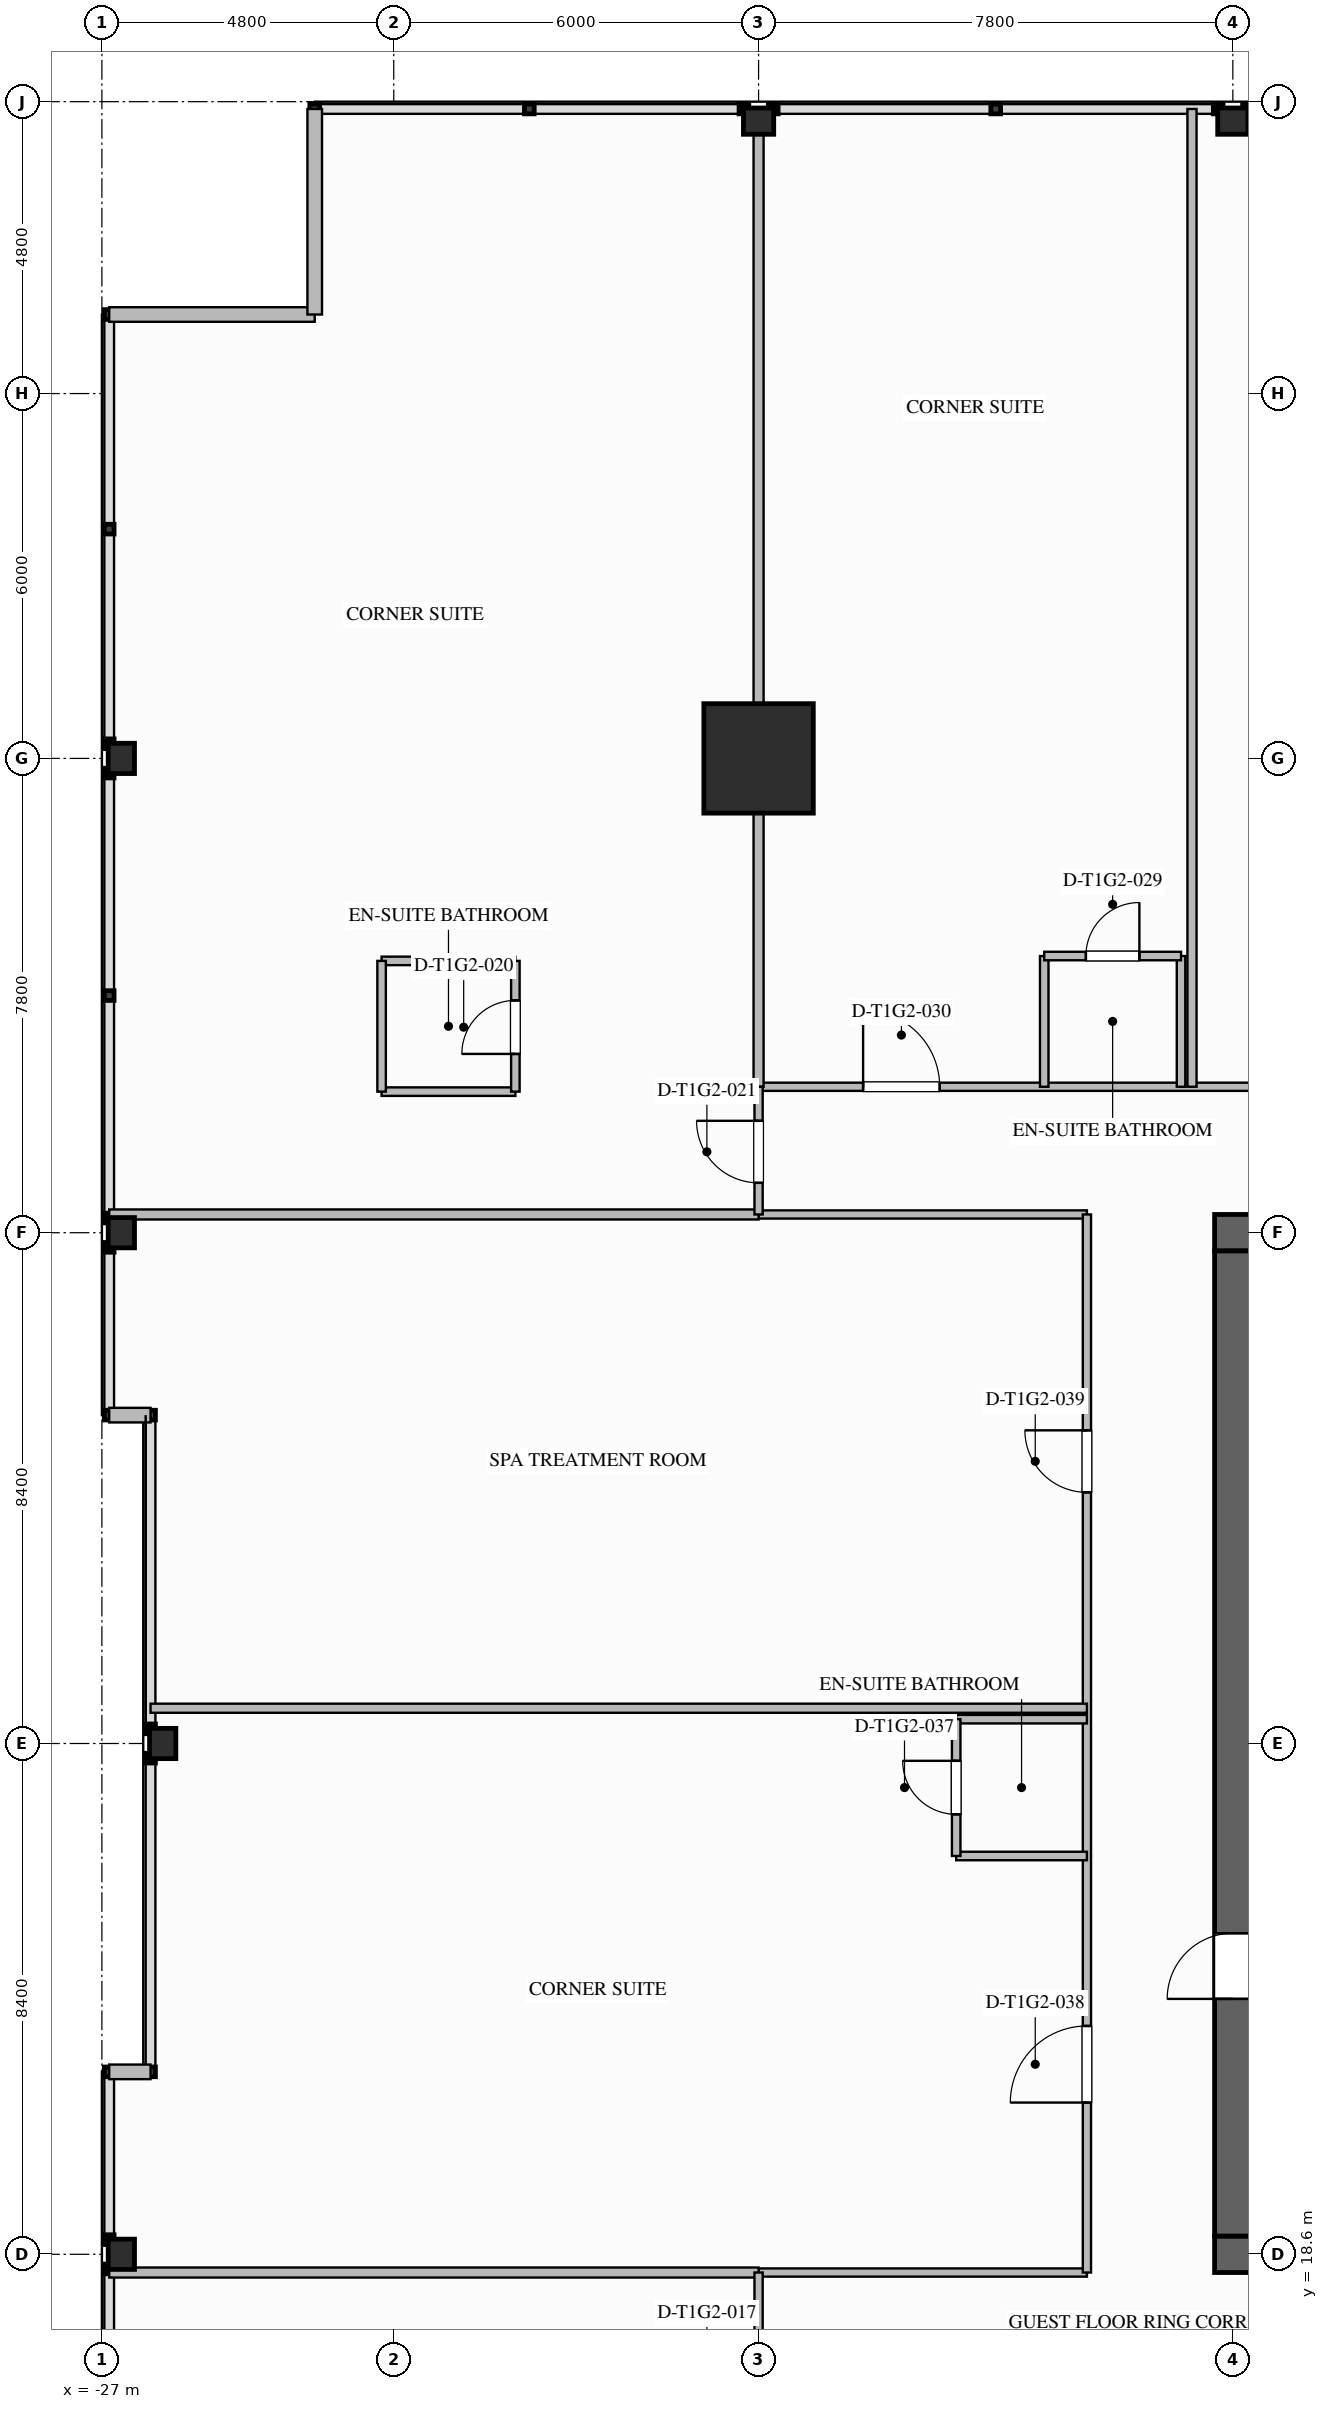
"""IFC4 building model, lengths in metres.
Left out: names, types, materials, properties, quantities, classifications, styles, units other than length and angle.
Written with IfcOpenShell. Run it as: python <this file> out.ifc"""

import sys

from ifc_helpers import new_model, si_unit, direction, frame, frame_2d, origin, origin_2d, place, context, subcontext, project, spatial, rectangle, i_section, extrude, element, fill, save


model = new_model("IFC4")
c1 = context("Model", 3, precision=1e-05, world=origin(), true_north=direction((0.0, 1.0)))
c2 = subcontext(c1, "Body", "Model", "MODEL_VIEW")
j1 = project(units=[si_unit("LENGTHUNIT", "METRE"), si_unit("PLANEANGLEUNIT", "RADIAN")], contexts=[c1])
p1 = place(None, origin())
s1 = spatial("IfcSite", under=j1, at=p1, CompositionType="ELEMENT")
p2 = place(p1, origin())
s2 = spatial("IfcBuilding", under=s1, at=p2, CompositionType="ELEMENT")
p3 = place(p2, frame((0.0, 0.0, 43.7)))
s3 = spatial("IfcBuildingStorey", under=s2, at=p3, CompositionType="ELEMENT", Elevation=43.7)
for number, where, z_axis, x_axis in (
    (1, (-8.7, 35.4, 0.0), (0.0, 0.0, 1.0), (1.0, 0.0, 0.0)),
    (2, (8.7, 18.6, 0.0), (0.0, 0.0, 1.0), (-1.0, 0.0, 0.0)),
):
    element("IfcWall", number, at=place(p3, frame(where, z_axis=z_axis, x_axis=x_axis)), inside=s3, PredefinedType="SHEAR", context=c2, shape_type="SweptSolid", body=[
        extrude(rectangle(XDim=17.4, YDim=0.6, at=frame_2d((8.7, 0.0))), origin(), (0.0, 0.0, 1.0), 3.5),
    ])
p4 = place(p3, frame((-8.4, 18.9, 0.0), z_axis=(0.0, 0.0, 1.0), x_axis=(0.0, 1.0, 0.0)))
e3 = element("IfcWall", 3, at=p4, inside=s3, PredefinedType="SHEAR", context=c2, shape_type="SweptSolid", body=[
    extrude(rectangle(XDim=16.2, YDim=0.6, at=frame_2d((8.1, 0.0))), origin(), (0.0, 0.0, 1.0), 3.5),
])
p5 = place(p4, frame((3.9, 0.0, 0.0)))
e4 = element("IfcOpeningElement", 4, at=p5, cuts=e3, PredefinedType="OPENING", context=c2, shape_type="SweptSolid", body=[
    extrude(rectangle(XDim=1.08, YDim=2.04, at=frame_2d((0.54, 1.02))), frame((0.0, 0.31, 0.0), z_axis=(0.0, -1.0, 0.0), x_axis=(1.0, 0.0, 0.0)), (0.0, 0.0, 1.0), 0.62),
])
p6 = place(p3, frame((-16.2, 43.2, 0.0), z_axis=(0.0, 0.0, 1.0), x_axis=(1.0, 0.0, 0.0)))
e5 = element("IfcColumn", 5, at=p6, inside=s3, PredefinedType="COLUMN", context=c2, shape_type="SweptSolid", body=[
    extrude(rectangle(XDim=1.8, YDim=1.8, at=origin_2d()), origin(), (0.0, 0.0, 1.0), 3.5),
])
for number, where, z_axis, x_axis in (
    (6, (-26.68, 18.6, 0.0), (0.0, 0.0, 1.0), (1.0, 0.0, 0.0)),
    (7, (-26.0, 27.0, 0.0), (0.0, 0.0, 1.0), (1.0, 0.0, 0.0)),
    (8, (-26.68, 35.4, 0.0), (0.0, 0.0, 1.0), (1.0, 0.0, 0.0)),
    (9, (-26.68, 43.2, 0.0), (0.0, 0.0, 1.0), (1.0, 0.0, 0.0)),
    (10, (-16.2, 53.68, 0.0), (0.0, 0.0, 1.0), (0.0, 1.0, 0.0)),
    (11, (-8.4, 53.68, 0.0), (0.0, 0.0, 1.0), (0.0, 1.0, 0.0)),
):
    element("IfcColumn", number, at=place(p3, frame(where, z_axis=z_axis, x_axis=x_axis)), inside=s3, PredefinedType="COLUMN", context=c2, shape_type="SweptSolid", body=[
        extrude(i_section(OverallWidth=0.432, OverallDepth=0.498, WebThickness=0.056, FlangeThickness=0.089, FilletRadius=0.03, at=origin_2d()), origin(), (0.0, 0.0, 1.0), 3.497),
    ])
for number, where, z_axis, x_axis in (
    (12, (-26.88, 50.5, 0.0), (0.0, 0.0, 1.0), (1.0, 0.0, 0.0)),
    (13, (-23.5, 50.5, 0.0), (0.0, 0.0, 1.0), (0.0, 1.0, 0.0)),
):
    element("IfcWall", number, at=place(p3, frame(where, z_axis=z_axis, x_axis=x_axis)), inside=s3, PredefinedType="STANDARD", context=c2, shape_type="SweptSolid", body=[
        extrude(rectangle(XDim=3.38, YDim=0.24, at=frame_2d((1.69, 0.0))), origin(), (0.0, 0.0, 1.0), 3.24),
    ])
for number, where, z_axis, x_axis in (
    (14, (-26.88, 21.6, 0.0), (0.0, 0.0, 1.0), (1.0, 0.0, 0.0)),
    (15, (-26.2, 32.4, 0.0), (0.0, 0.0, 1.0), (-1.0, 0.0, 0.0)),
):
    element("IfcWall", number, at=place(p3, frame(where, z_axis=z_axis, x_axis=x_axis)), inside=s3, PredefinedType="STANDARD", context=c2, shape_type="SweptSolid", body=[
        extrude(rectangle(XDim=0.68, YDim=0.24, at=frame_2d((0.34, 0.0))), origin(), (0.0, 0.0, 1.0), 3.24),
    ])
p7 = place(p3, frame((-16.2, 37.8, 0.0), z_axis=(0.0, 0.0, 1.0), x_axis=(1.0, 0.0, 0.0)))
e16 = element("IfcWall", 16, at=p7, inside=s3, PredefinedType="PARTITIONING", context=c2, shape_type="SweptSolid", body=[
    extrude(rectangle(XDim=32.4, YDim=0.135, at=frame_2d((16.2, 0.0))), origin(), (0.0, 0.0, 1.0), 3.24),
])
p8 = place(p7, frame((1.719, 0.0, 0.0)))
e17 = element("IfcOpeningElement", 17, at=p8, cuts=e16, PredefinedType="OPENING", context=c2, shape_type="SweptSolid", body=[
    extrude(rectangle(XDim=1.26, YDim=2.2, at=frame_2d((0.63, 1.1))), frame((0.0, 0.077, 0.0), z_axis=(0.0, -1.0, 0.0), x_axis=(1.0, 0.0, 0.0)), (0.0, 0.0, 1.0), 0.155),
])
p9 = place(p7, frame((10.143, 0.0, 0.0)))
e18 = element("IfcOpeningElement", 18, at=p9, cuts=e16, PredefinedType="OPENING", context=c2, shape_type="SweptSolid", body=[
    extrude(rectangle(XDim=1.26, YDim=2.2, at=frame_2d((0.63, 1.1))), frame((0.0, 0.077, 0.0), z_axis=(0.0, -1.0, 0.0), x_axis=(1.0, 0.0, 0.0)), (0.0, 0.0, 1.0), 0.155),
])
p10 = place(p7, frame((18.567, 0.0, 0.0)))
e19 = element("IfcOpeningElement", 19, at=p10, cuts=e16, PredefinedType="OPENING", context=c2, shape_type="SweptSolid", body=[
    extrude(rectangle(XDim=1.26, YDim=2.2, at=frame_2d((0.63, 1.1))), frame((0.0, 0.077, 0.0), z_axis=(0.0, -1.0, 0.0), x_axis=(1.0, 0.0, 0.0)), (0.0, 0.0, 1.0), 0.155),
])
p11 = place(p7, frame((26.343, 0.0, 0.0)))
e20 = element("IfcOpeningElement", 20, at=p11, cuts=e16, PredefinedType="OPENING", context=c2, shape_type="SweptSolid", body=[
    extrude(rectangle(XDim=1.26, YDim=2.2, at=frame_2d((0.63, 1.1))), frame((0.0, 0.077, 0.0), z_axis=(0.0, -1.0, 0.0), x_axis=(1.0, 0.0, 0.0)), (0.0, 0.0, 1.0), 0.155),
])
for number, where, z_axis, x_axis in (
    (21, (-16.2, 18.3, 0.0), (0.0, 0.0, 1.0), (1.0, 0.0, 0.0)),
    (22, (-16.2, 35.7, 0.0), (0.0, 0.0, 1.0), (1.0, 0.0, 0.0)),
):
    element("IfcWall", number, at=place(p3, frame(where, z_axis=z_axis, x_axis=x_axis)), inside=s3, PredefinedType="PARTITIONING", context=c2, shape_type="SweptSolid", body=[
        extrude(rectangle(XDim=5.4, YDim=0.135, at=frame_2d((2.7, 0.0))), origin(), (0.0, 0.0, 1.0), 3.24),
    ])
p12 = place(p3, frame((-10.8, 18.3, 0.0), z_axis=(0.0, 0.0, 1.0), x_axis=(0.0, 1.0, 0.0)))
e23 = element("IfcWall", 23, at=p12, inside=s3, PredefinedType="PARTITIONING", context=c2, shape_type="SweptSolid", body=[
    extrude(rectangle(XDim=17.4, YDim=0.135, at=frame_2d((8.7, 0.0))), origin(), (0.0, 0.0, 1.0), 3.24),
])
p13 = place(p12, frame((2.795, 0.0, 0.0)))
e24 = element("IfcOpeningElement", 24, at=p13, cuts=e23, PredefinedType="OPENING", context=c2, shape_type="SweptSolid", body=[
    extrude(rectangle(XDim=1.26, YDim=2.2, at=frame_2d((0.63, 1.1))), frame((0.0, 0.077, 0.0), z_axis=(0.0, -1.0, 0.0), x_axis=(1.0, 0.0, 0.0)), (0.0, 0.0, 1.0), 0.155),
])
p14 = place(p12, frame((12.83, 0.0, 0.0)))
e25 = element("IfcOpeningElement", 25, at=p14, cuts=e23, PredefinedType="OPENING", context=c2, shape_type="SweptSolid", body=[
    extrude(rectangle(XDim=1.02, YDim=2.15, at=frame_2d((0.51, 1.075))), frame((0.0, 0.077, 0.0), z_axis=(0.0, -1.0, 0.0), x_axis=(1.0, 0.0, 0.0)), (0.0, 0.0, 1.0), 0.155),
])
p15 = place(p3, frame((-16.2, 37.8, 0.0), z_axis=(0.0, 0.0, 1.0), x_axis=(0.0, 1.0, 0.0)))
e26 = element("IfcWall", 26, at=p15, inside=s3, PredefinedType="PARTITIONING", context=c2, shape_type="SweptSolid", body=[
    extrude(rectangle(XDim=16.08, YDim=0.165, at=frame_2d((8.04, 0.0))), origin(), (0.0, 0.0, 1.0), 2.298),
])
for number, where, z_axis, x_axis in (
    (27, (-26.88, 18.3, 0.0), (0.0, 0.0, 1.0), (1.0, 0.0, 0.0)),
    (28, (-26.88, 35.7, 0.0), (0.0, 0.0, 1.0), (1.0, 0.0, 0.0)),
):
    element("IfcWall", number, at=place(p3, frame(where, z_axis=z_axis, x_axis=x_axis)), inside=s3, PredefinedType="PARTITIONING", context=c2, shape_type="SweptSolid", body=[
        extrude(rectangle(XDim=10.68, YDim=0.165, at=frame_2d((5.34, 0.0))), origin(), (0.0, 0.0, 1.0), 2.298),
    ])
p16 = place(p3, frame((-16.2, 15.6, 0.0), z_axis=(0.0, 0.0, 1.0), x_axis=(0.0, 1.0, 0.0)))
e29 = element("IfcWall", 29, at=p16, inside=s3, PredefinedType="PARTITIONING", context=c2, shape_type="SweptSolid", body=[
    extrude(rectangle(XDim=2.7, YDim=0.135, at=frame_2d((1.35, 0.0))), origin(), (0.0, 0.0, 1.0), 2.298),
])
p17 = place(p16, frame((0.52, 0.0, 0.0)))
e30 = element("IfcOpeningElement", 30, at=p17, cuts=e29, PredefinedType="OPENING", context=c2, shape_type="SweptSolid", body=[
    extrude(rectangle(XDim=1.02, YDim=2.15, at=frame_2d((0.51, 1.075))), frame((0.0, 0.077, 0.0), z_axis=(0.0, -1.0, 0.0), x_axis=(1.0, 0.0, 0.0)), (0.0, 0.0, 1.0), 0.155),
])
p18 = place(p3, frame((-16.2, 35.7, 0.0), z_axis=(0.0, 0.0, 1.0), x_axis=(0.0, 1.0, 0.0)))
e31 = element("IfcWall", 31, at=p18, inside=s3, PredefinedType="PARTITIONING", context=c2, shape_type="SweptSolid", body=[
    extrude(rectangle(XDim=2.1, YDim=0.135, at=frame_2d((1.05, 0.0))), origin(), (0.0, 0.0, 1.0), 2.298),
])
p19 = place(p18, frame((0.52, 0.0, 0.0)))
e32 = element("IfcOpeningElement", 32, at=p19, cuts=e31, PredefinedType="OPENING", context=c2, shape_type="SweptSolid", body=[
    extrude(rectangle(XDim=1.02, YDim=2.15, at=frame_2d((0.51, 1.075))), frame((0.0, 0.077, 0.0), z_axis=(0.0, -1.0, 0.0), x_axis=(1.0, 0.0, 0.0)), (0.0, 0.0, 1.0), 0.155),
])
for number, where, z_axis, x_axis in (
    (33, (-22.4, 37.72, 0.0), (0.0, 0.0, 1.0), (1.0, 0.0, 0.0)),
    (34, (-22.4, 39.87, 0.0), (0.0, 0.0, 1.0), (1.0, 0.0, 0.0)),
):
    element("IfcWall", number, at=place(p3, frame(where, z_axis=z_axis, x_axis=x_axis)), inside=s3, PredefinedType="PLUMBINGWALL", context=c2, shape_type="SweptSolid", body=[
        extrude(rectangle(XDim=2.2, YDim=0.14, at=frame_2d((1.1, 0.0))), origin(), (0.0, 0.0, 1.0), 3.24),
    ])
p20 = place(p3, frame((-22.4, 37.72, 0.0), z_axis=(0.0, 0.0, 1.0), x_axis=(0.0, 1.0, 0.0)))
e35 = element("IfcWall", 35, at=p20, inside=s3, PredefinedType="PLUMBINGWALL", context=c2, shape_type="SweptSolid", body=[
    extrude(rectangle(XDim=2.15, YDim=0.14, at=frame_2d((1.075, 0.0))), origin(), (0.0, 0.0, 1.0), 3.24),
])
p21 = place(p3, frame((-20.2, 37.72, 0.0), z_axis=(0.0, 0.0, 1.0), x_axis=(0.0, 1.0, 0.0)))
e36 = element("IfcWall", 36, at=p21, inside=s3, PredefinedType="PLUMBINGWALL", context=c2, shape_type="SweptSolid", body=[
    extrude(rectangle(XDim=2.15, YDim=0.14, at=frame_2d((1.075, 0.0))), origin(), (0.0, 0.0, 1.0), 3.24),
])
p22 = place(p21, frame((0.62, 0.0, 0.0)))
e37 = element("IfcOpeningElement", 37, at=p22, cuts=e36, PredefinedType="OPENING", context=c2, shape_type="SweptSolid", body=[
    extrude(rectangle(XDim=0.88, YDim=2.1, at=frame_2d((0.44, 1.05))), frame((0.0, 0.08, 0.0), z_axis=(0.0, -1.0, 0.0), x_axis=(1.0, 0.0, 0.0)), (0.0, 0.0, 1.0), 0.16),
])
for number, where, z_axis, x_axis in (
    (38, (-11.502, 37.8, 0.0), (0.0, 0.0, 1.0), (0.0, 1.0, 0.0)),
    (39, (-9.252, 37.8, 0.0), (0.0, 0.0, 1.0), (0.0, 1.0, 0.0)),
):
    element("IfcWall", number, at=place(p3, frame(where, z_axis=z_axis, x_axis=x_axis)), inside=s3, PredefinedType="PLUMBINGWALL", context=c2, shape_type="SweptSolid", body=[
        extrude(rectangle(XDim=2.15, YDim=0.14, at=frame_2d((1.075, 0.0))), origin(), (0.0, 0.0, 1.0), 3.24),
    ])
p23 = place(p3, frame((-11.502, 39.95, 0.0), z_axis=(0.0, 0.0, 1.0), x_axis=(1.0, 0.0, 0.0)))
e40 = element("IfcWall", 40, at=p23, inside=s3, PredefinedType="PLUMBINGWALL", context=c2, shape_type="SweptSolid", body=[
    extrude(rectangle(XDim=2.25, YDim=0.14, at=frame_2d((1.125, 0.0))), origin(), (0.0, 0.0, 1.0), 3.24),
])
p24 = place(p23, frame((0.685, 0.0, 0.0)))
e41 = element("IfcOpeningElement", 41, at=p24, cuts=e40, PredefinedType="OPENING", context=c2, shape_type="SweptSolid", body=[
    extrude(rectangle(XDim=0.88, YDim=2.1, at=frame_2d((0.44, 1.05))), frame((0.0, 0.08, 0.0), z_axis=(0.0, -1.0, 0.0), x_axis=(1.0, 0.0, 0.0)), (0.0, 0.0, 1.0), 0.16),
])
p25 = place(p3, frame((-9.072, 37.8, 0.0), z_axis=(0.0, 0.0, 1.0), x_axis=(0.0, 1.0, 0.0)))
e42 = element("IfcWall", 42, at=p25, inside=s3, PredefinedType="PARTITIONING", context=c2, shape_type="SweptSolid", body=[
    extrude(rectangle(XDim=16.08, YDim=0.15, at=frame_2d((8.04, 0.0))), origin(), (0.0, 0.0, 1.0), 3.24),
])
for number, where, z_axis, x_axis in (
    (43, (-10.8, 25.15, 0.0), (0.0, 0.0, 1.0), (-1.0, 0.0, 0.0)),
    (44, (-10.8, 27.4, 0.0), (0.0, 0.0, 1.0), (-1.0, 0.0, 0.0)),
):
    element("IfcWall", number, at=place(p3, frame(where, z_axis=z_axis, x_axis=x_axis)), inside=s3, PredefinedType="PLUMBINGWALL", context=c2, shape_type="SweptSolid", body=[
        extrude(rectangle(XDim=2.15, YDim=0.14, at=frame_2d((1.075, 0.0))), origin(), (0.0, 0.0, 1.0), 3.24),
    ])
p26 = place(p3, frame((-12.95, 25.15, 0.0), z_axis=(0.0, 0.0, 1.0), x_axis=(0.0, 1.0, 0.0)))
e45 = element("IfcWall", 45, at=p26, inside=s3, PredefinedType="PLUMBINGWALL", context=c2, shape_type="SweptSolid", body=[
    extrude(rectangle(XDim=2.25, YDim=0.14, at=frame_2d((1.125, 0.0))), origin(), (0.0, 0.0, 1.0), 3.24),
])
p27 = place(p26, frame((0.685, 0.0, 0.0)))
e46 = element("IfcOpeningElement", 46, at=p27, cuts=e45, PredefinedType="OPENING", context=c2, shape_type="SweptSolid", body=[
    extrude(rectangle(XDim=0.88, YDim=2.1, at=frame_2d((0.44, 1.05))), frame((0.0, 0.08, 0.0), z_axis=(0.0, -1.0, 0.0), x_axis=(1.0, 0.0, 0.0)), (0.0, 0.0, 1.0), 0.16),
])
p28 = place(p3, frame((-26.2, 27.58, 0.0), z_axis=(0.0, 0.0, 1.0), x_axis=(1.0, 0.0, 0.0)))
e47 = element("IfcWall", 47, at=p28, inside=s3, PredefinedType="PARTITIONING", context=c2, shape_type="SweptSolid", body=[
    extrude(rectangle(XDim=15.4, YDim=0.15, at=frame_2d((7.7, 0.0))), origin(), (0.0, 0.0, 1.0), 3.24),
])
p29 = place(p5, origin())
e48 = element("IfcDoor", 48, at=p29, inside=s3, OperationType="SINGLE_SWING_LEFT", PredefinedType="DOOR", context=c2, shape_type="SweptSolid", body=[
    extrude(rectangle(XDim=1.08, YDim=2.04, at=frame_2d((0.54, 1.02))), frame((0.0, 0.025, 0.0), z_axis=(0.0, -1.0, 0.0), x_axis=(1.0, 0.0, 0.0)), (0.0, 0.0, 1.0), 0.05),
])
fill(e4, e48)
p30 = place(p22, origin())
e49 = element("IfcDoor", 49, at=p30, inside=s3, OperationType="SINGLE_SWING_LEFT", PredefinedType="DOOR", context=c2, shape_type="SweptSolid", body=[
    extrude(rectangle(XDim=0.88, YDim=2.1, at=frame_2d((0.44, 1.05))), frame((0.0, 0.025, 0.0), z_axis=(0.0, -1.0, 0.0), x_axis=(1.0, 0.0, 0.0)), (0.0, 0.0, 1.0), 0.05),
])
fill(e37, e49)
p31 = place(p19, origin())
e50 = element("IfcDoor", 50, at=p31, inside=s3, OperationType="SINGLE_SWING_RIGHT", PredefinedType="DOOR", context=c2, shape_type="SweptSolid", body=[
    extrude(rectangle(XDim=1.02, YDim=2.15, at=frame_2d((0.51, 1.075))), frame((0.0, 0.025, 0.0), z_axis=(0.0, -1.0, 0.0), x_axis=(1.0, 0.0, 0.0)), (0.0, 0.0, 1.0), 0.05),
])
fill(e32, e50)
p32 = place(p24, origin())
e51 = element("IfcDoor", 51, at=p32, inside=s3, OperationType="SINGLE_SWING_RIGHT", PredefinedType="DOOR", context=c2, shape_type="SweptSolid", body=[
    extrude(rectangle(XDim=0.88, YDim=2.1, at=frame_2d((0.44, 1.05))), frame((0.0, 0.025, 0.0), z_axis=(0.0, -1.0, 0.0), x_axis=(1.0, 0.0, 0.0)), (0.0, 0.0, 1.0), 0.05),
])
fill(e41, e51)
p33 = place(p8, origin())
e52 = element("IfcDoor", 52, at=p33, inside=s3, OperationType="SINGLE_SWING_LEFT", PredefinedType="DOOR", context=c2, shape_type="SweptSolid", body=[
    extrude(rectangle(XDim=1.26, YDim=2.2, at=frame_2d((0.63, 1.1))), frame((0.0, 0.025, 0.0), z_axis=(0.0, -1.0, 0.0), x_axis=(1.0, 0.0, 0.0)), (0.0, 0.0, 1.0), 0.05),
])
fill(e17, e52)
p34 = place(p27, origin())
e53 = element("IfcDoor", 53, at=p34, inside=s3, OperationType="SINGLE_SWING_RIGHT", PredefinedType="DOOR", context=c2, shape_type="SweptSolid", body=[
    extrude(rectangle(XDim=0.88, YDim=2.1, at=frame_2d((0.44, 1.05))), frame((0.0, 0.025, 0.0), z_axis=(0.0, -1.0, 0.0), x_axis=(1.0, 0.0, 0.0)), (0.0, 0.0, 1.0), 0.05),
])
fill(e46, e53)
p35 = place(p13, origin())
e54 = element("IfcDoor", 54, at=p35, inside=s3, OperationType="SINGLE_SWING_LEFT", PredefinedType="DOOR", context=c2, shape_type="SweptSolid", body=[
    extrude(rectangle(XDim=1.26, YDim=2.2, at=frame_2d((0.63, 1.1))), frame((0.0, 0.025, 0.0), z_axis=(0.0, -1.0, 0.0), x_axis=(1.0, 0.0, 0.0)), (0.0, 0.0, 1.0), 0.05),
])
fill(e24, e54)
p36 = place(p14, origin())
e55 = element("IfcDoor", 55, at=p36, inside=s3, OperationType="SINGLE_SWING_RIGHT", PredefinedType="DOOR", context=c2, shape_type="SweptSolid", body=[
    extrude(rectangle(XDim=1.02, YDim=2.15, at=frame_2d((0.51, 1.075))), frame((0.0, 0.025, 0.0), z_axis=(0.0, -1.0, 0.0), x_axis=(1.0, 0.0, 0.0)), (0.0, 0.0, 1.0), 0.05),
])
fill(e25, e55)
save(model, sys.argv[1])
